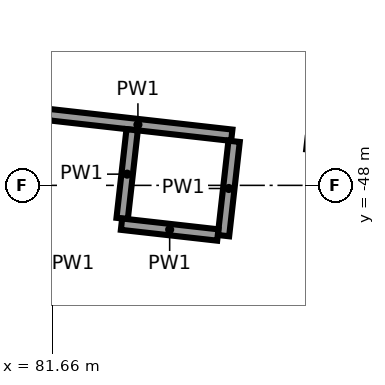
"""IFC4 building model, lengths in metres.
Left out: names, types, materials, properties, quantities, classifications, styles, units other than length and angle.
Written with IfcOpenShell. Run it as: python <this file> out.ifc"""

import sys

from ifc_helpers import new_model, si_unit, direction, frame, frame_2d, origin, place, context, subcontext, project, spatial, rectangle, extrude, element, save


model = new_model("IFC4")
c1 = context("Model", 3, precision=1e-05, world=origin(), true_north=direction((0.0, 1.0)))
c2 = subcontext(c1, "Body", "Model", "MODEL_VIEW")
j1 = project(units=[si_unit("LENGTHUNIT", "METRE"), si_unit("PLANEANGLEUNIT", "RADIAN")], contexts=[c1])
p1 = place(None, origin())
s1 = spatial("IfcSite", under=j1, at=p1, CompositionType="ELEMENT")
p2 = place(p1, origin())
s2 = spatial("IfcBuilding", under=s1, at=p2, CompositionType="ELEMENT")
p3 = place(p2, origin())
s3 = spatial("IfcBuildingStorey", under=s2, at=p3, CompositionType="ELEMENT", Elevation=0.0)
p4 = place(p3, frame((84.023, -47.341, 0.0), z_axis=(0.0, 0.0, 1.0), x_axis=(-0.993701549417, 0.112059049998, 0.0)))
e1 = element("IfcWall", 1, at=p4, inside=s3, PredefinedType="PARTITIONING", context=c2, shape_type="SweptSolid", body=[
    extrude(rectangle(XDim=2.486, YDim=0.15, at=frame_2d((1.243, 0.0))), origin(), (0.0, 0.0, 1.0), 6.15),
])
p5 = place(p3, frame((83.913, -48.662, 0.0), z_axis=(0.0, 0.0, 1.0), x_axis=(0.111804424032, 0.993730230378, 0.0)))
e2 = element("IfcWall", 2, at=p5, inside=s3, PredefinedType="PARTITIONING", context=c2, shape_type="SweptSolid", body=[
    extrude(rectangle(XDim=1.249, YDim=0.15, at=frame_2d((0.625, 0.0))), origin(), (0.0, 0.0, 1.0), 6.15),
])
p6 = place(p3, frame((82.712, -47.269, 0.0), z_axis=(0.0, 0.0, 1.0), x_axis=(-0.112097694808, -0.993697190707, 0.0)))
e3 = element("IfcWall", 3, at=p6, inside=s3, PredefinedType="PARTITIONING", context=c2, shape_type="SweptSolid", body=[
    extrude(rectangle(XDim=1.174, YDim=0.15, at=frame_2d((0.587, 0.0))), origin(), (0.0, 0.0, 1.0), 6.15),
])
p7 = place(p3, frame((82.572, -48.51, 0.0), z_axis=(0.0, 0.0, 1.0), x_axis=(0.993726262285, -0.111839687257, 0.0)))
e4 = element("IfcWall", 4, at=p7, inside=s3, PredefinedType="PARTITIONING", context=c2, shape_type="SweptSolid", body=[
    extrude(rectangle(XDim=1.275, YDim=0.15, at=frame_2d((0.637, 0.0))), origin(), (0.0, 0.0, 1.0), 6.15),
])
save(model, sys.argv[1])
